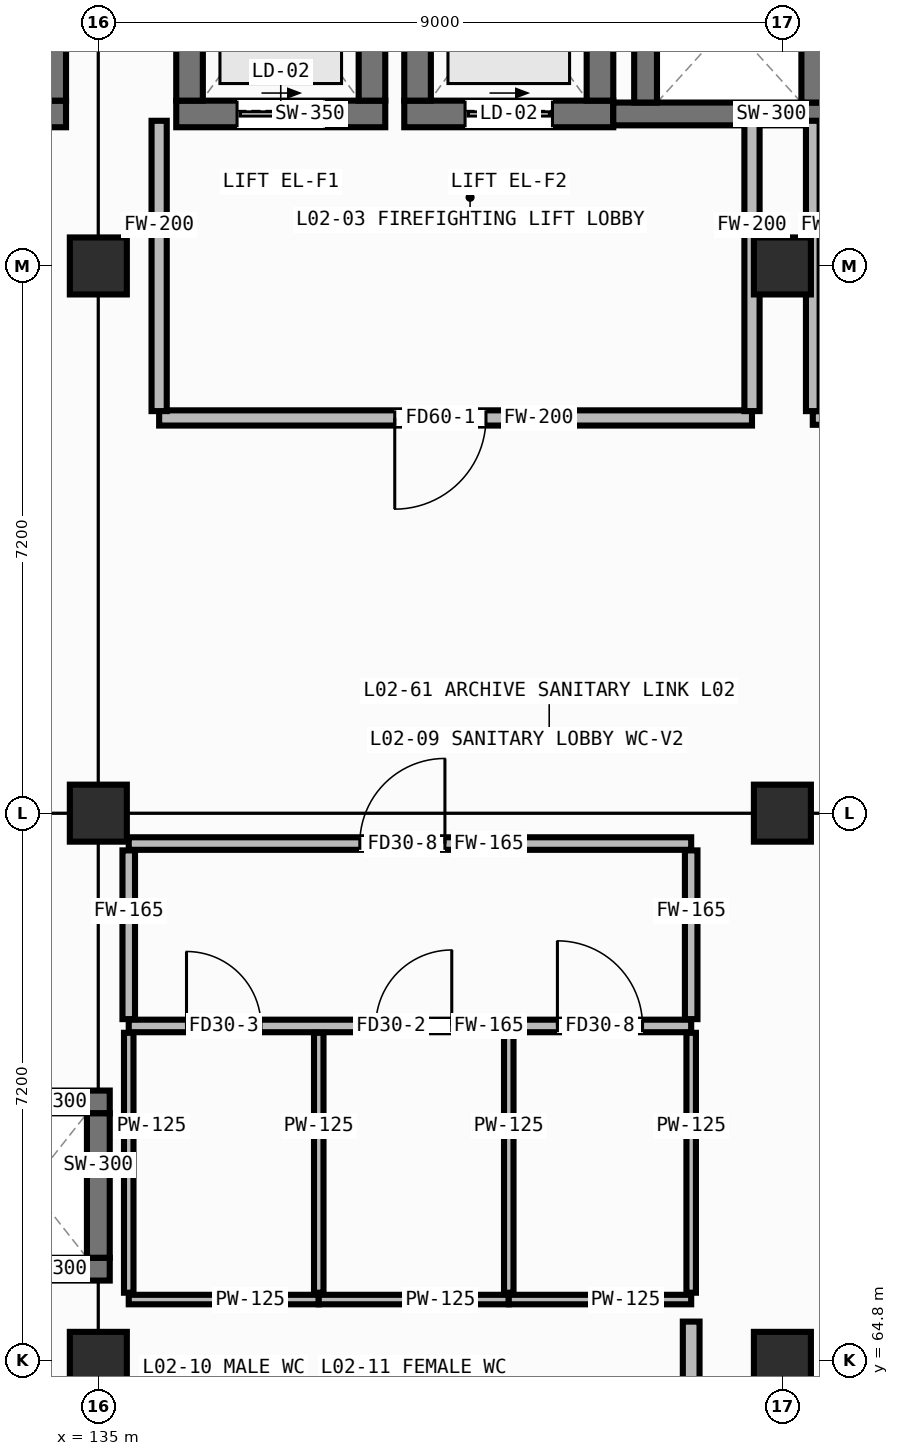
"""IFC4 building model, lengths in metres.
Left out: names, types, materials, properties, quantities, classifications, styles, units other than length and angle.
Written with IfcOpenShell. Run it as: python <this file> out.ifc"""

import sys

from ifc_helpers import new_model, si_unit, direction, frame, frame_2d, origin, origin_2d, place, context, subcontext, project, spatial, rectangle, hollow_rectangle, extrude, element, fill, save


model = new_model("IFC4")
c1 = context("Model", 3, precision=1e-05, world=origin(), true_north=direction((0.0, 1.0)))
c2 = subcontext(c1, "Body", "Model", "MODEL_VIEW")
j1 = project(units=[si_unit("LENGTHUNIT", "METRE"), si_unit("PLANEANGLEUNIT", "RADIAN")], contexts=[c1])
p1 = place(None, origin())
s1 = spatial("IfcSite", under=j1, at=p1, CompositionType="ELEMENT")
p2 = place(p1, origin())
s2 = spatial("IfcBuilding", under=s1, at=p2, CompositionType="ELEMENT")
p3 = place(p2, frame((0.0, 0.0, 4.8)))
s3 = spatial("IfcBuildingStorey", under=s2, at=p3, CompositionType="ELEMENT", Elevation=4.8)
for number, where, z_axis, x_axis in (
    (1, (135.0, 64.8, 0.0), (0.0, 0.0, 1.0), (1.0, 0.0, 0.0)),
    (2, (135.0, 72.0, 0.0), (0.0, 0.0, 1.0), (1.0, 0.0, 0.0)),
    (3, (135.0, 79.2, 0.0), (0.0, 0.0, 1.0), (1.0, 0.0, 0.0)),
    (4, (144.0, 64.8, 0.0), (0.0, 0.0, 1.0), (1.0, 0.0, 0.0)),
    (5, (144.0, 72.0, 0.0), (0.0, 0.0, 1.0), (1.0, 0.0, 0.0)),
    (6, (144.0, 79.2, 0.0), (0.0, 0.0, 1.0), (1.0, 0.0, 0.0)),
):
    element("IfcColumn", number, at=place(p3, frame(where, z_axis=z_axis, x_axis=x_axis)), inside=s3, PredefinedType="COLUMN", context=c2, shape_type="SweptSolid", body=[
        extrude(hollow_rectangle(XDim=0.75, YDim=0.75, WallThickness=0.032, at=origin_2d()), origin(), (0.0, 0.0, 1.0), 4.0),
    ])
p4 = place(p3, frame((126.425, 81.2, 0.0), z_axis=(0.0, 0.0, 1.0), x_axis=(1.0, 0.0, 0.0)))
e7 = element("IfcWall", 7, at=p4, inside=s3, PredefinedType="SHEAR", context=c2, shape_type="SweptSolid", body=[
    extrude(rectangle(XDim=8.15, YDim=0.35, at=frame_2d((4.075, 0.0))), origin(), (0.0, 0.0, 1.0), 3.755),
])
p5 = place(p4, frame((0.525, 0.0, 0.0)))
e8 = element("IfcOpeningElement", 8, at=p5, cuts=e7, PredefinedType="OPENING", context=c2, shape_type="SweptSolid", body=[
    extrude(rectangle(XDim=1.15, YDim=2.1, at=frame_2d((0.575, 1.05))), frame((0.0, 0.187, 0.0), z_axis=(0.0, -1.0, 0.0), x_axis=(1.0, 0.0, 0.0)), (0.0, 0.0, 1.0), 0.374),
])
p6 = place(p3, frame((134.4, 81.375, 0.0), z_axis=(0.0, 0.0, 1.0), x_axis=(0.0, 1.0, 0.0)))
e9 = element("IfcWall", 9, at=p6, inside=s3, PredefinedType="SHEAR", context=c2, shape_type="SweptSolid", body=[
    extrude(rectangle(XDim=3.55, YDim=0.35, at=frame_2d((1.775, 0.0))), origin(), (0.0, 0.0, 1.0), 3.755),
])
p7 = place(p3, frame((136.025, 81.2, 0.0), z_axis=(0.0, 0.0, 1.0), x_axis=(1.0, 0.0, 0.0)))
e10 = element("IfcWall", 10, at=p7, inside=s3, PredefinedType="SHEAR", context=c2, shape_type="SweptSolid", body=[
    extrude(rectangle(XDim=2.75, YDim=0.35, at=frame_2d((1.375, 0.0))), origin(), (0.0, 0.0, 1.0), 3.755),
])
p8 = place(p7, frame((0.8, 0.0, 0.0)))
e11 = element("IfcOpeningElement", 11, at=p8, cuts=e10, PredefinedType="OPENING", context=c2, shape_type="SweptSolid", body=[
    extrude(rectangle(XDim=1.15, YDim=2.12, at=frame_2d((0.575, 1.06))), frame((0.0, 0.187, 0.0), z_axis=(0.0, -1.0, 0.0), x_axis=(1.0, 0.0, 0.0)), (0.0, 0.0, 1.0), 0.374),
])
for number, where, z_axis, x_axis in (
    (12, (136.2, 81.375, 0.0), (0.0, 0.0, 1.0), (0.0, 1.0, 0.0)),
    (13, (138.6, 81.375, 0.0), (0.0, 0.0, 1.0), (0.0, 1.0, 0.0)),
):
    element("IfcWall", number, at=place(p3, frame(where, z_axis=z_axis, x_axis=x_axis)), inside=s3, PredefinedType="SHEAR", context=c2, shape_type="SweptSolid", body=[
        extrude(rectangle(XDim=2.85, YDim=0.35, at=frame_2d((1.425, 0.0))), origin(), (0.0, 0.0, 1.0), 3.755),
    ])
p9 = place(p3, frame((139.025, 81.2, 0.0), z_axis=(0.0, 0.0, 1.0), x_axis=(1.0, 0.0, 0.0)))
e14 = element("IfcWall", 14, at=p9, inside=s3, PredefinedType="SHEAR", context=c2, shape_type="SweptSolid", body=[
    extrude(rectangle(XDim=2.75, YDim=0.35, at=frame_2d((1.375, 0.0))), origin(), (0.0, 0.0, 1.0), 3.755),
])
p10 = place(p9, frame((0.8, 0.0, 0.0)))
e15 = element("IfcOpeningElement", 15, at=p10, cuts=e14, PredefinedType="OPENING", context=c2, shape_type="SweptSolid", body=[
    extrude(rectangle(XDim=1.15, YDim=2.12, at=frame_2d((0.575, 1.06))), frame((0.0, 0.187, 0.0), z_axis=(0.0, -1.0, 0.0), x_axis=(1.0, 0.0, 0.0)), (0.0, 0.0, 1.0), 0.374),
])
for number, where, z_axis, x_axis in (
    (16, (139.2, 81.375, 0.0), (0.0, 0.0, 1.0), (0.0, 1.0, 0.0)),
    (17, (141.6, 81.375, 0.0), (0.0, 0.0, 1.0), (0.0, 1.0, 0.0)),
):
    element("IfcWall", number, at=place(p3, frame(where, z_axis=z_axis, x_axis=x_axis)), inside=s3, PredefinedType="SHEAR", context=c2, shape_type="SweptSolid", body=[
        extrude(rectangle(XDim=2.85, YDim=0.35, at=frame_2d((1.425, 0.0))), origin(), (0.0, 0.0, 1.0), 3.755),
    ])
p11 = place(p3, frame((141.775, 81.2, 0.0), z_axis=(0.0, 0.0, 1.0), x_axis=(1.0, 0.0, 0.0)))
e18 = element("IfcWall", 18, at=p11, inside=s3, PredefinedType="SHEAR", context=c2, shape_type="SweptSolid", body=[
    extrude(rectangle(XDim=3.25, YDim=0.3, at=frame_2d((1.625, 0.0))), origin(), (0.0, 0.0, 1.0), 3.755),
])
for number, where, z_axis, x_axis in (
    (19, (142.2, 81.35, 0.0), (0.0, 0.0, 1.0), (0.0, 1.0, 0.0)),
    (20, (144.4, 81.35, 0.0), (0.0, 0.0, 1.0), (0.0, 1.0, 0.0)),
    (21, (133.05, 66.0, 0.0), (0.0, 0.0, 1.0), (1.0, 0.0, 0.0)),
    (22, (133.05, 68.2, 0.0), (0.0, 0.0, 1.0), (1.0, 0.0, 0.0)),
):
    element("IfcWall", number, at=place(p3, frame(where, z_axis=z_axis, x_axis=x_axis)), inside=s3, PredefinedType="SHEAR", context=c2, shape_type="SweptSolid", body=[
        extrude(rectangle(XDim=2.1, YDim=0.3, at=frame_2d((1.05, 0.0))), origin(), (0.0, 0.0, 1.0), 3.755),
    ])
p12 = place(p3, frame((135.0, 66.15, 0.0), z_axis=(0.0, 0.0, 1.0), x_axis=(0.0, 1.0, 0.0)))
e23 = element("IfcWall", 23, at=p12, inside=s3, PredefinedType="SHEAR", context=c2, shape_type="SweptSolid", body=[
    extrude(rectangle(XDim=1.9, YDim=0.3, at=frame_2d((0.95, 0.0))), origin(), (0.0, 0.0, 1.0), 3.755),
])
p13 = place(p3, frame((135.8, 77.2, 0.0), z_axis=(0.0, 0.0, 1.0), x_axis=(1.0, 0.0, 0.0)))
e24 = element("IfcWall", 24, at=p13, inside=s3, PredefinedType="PARTITIONING", context=c2, shape_type="SweptSolid", body=[
    extrude(rectangle(XDim=7.8, YDim=0.2, at=frame_2d((3.9, 0.0))), origin(), (0.0, 0.0, 1.0), 3.755),
])
p14 = place(p13, frame((3.1, 0.0, 0.0)))
e25 = element("IfcOpeningElement", 25, at=p14, cuts=e24, PredefinedType="OPENING", context=c2, shape_type="SweptSolid", body=[
    extrude(rectangle(XDim=1.2, YDim=2.1, at=frame_2d((0.6, 1.05))), frame((0.0, 0.112, 0.0), z_axis=(0.0, -1.0, 0.0), x_axis=(1.0, 0.0, 0.0)), (0.0, 0.0, 1.0), 0.224),
])
for number, where, z_axis, x_axis in (
    (26, (135.8, 77.29, 0.0), (0.0, 0.0, 1.0), (0.0, 1.0, 0.0)),
    (27, (143.6, 77.29, 0.0), (0.0, 0.0, 1.0), (0.0, 1.0, 0.0)),
):
    element("IfcWall", number, at=place(p3, frame(where, z_axis=z_axis, x_axis=x_axis)), inside=s3, PredefinedType="PARTITIONING", context=c2, shape_type="SweptSolid", body=[
        extrude(rectangle(XDim=3.82, YDim=0.2, at=frame_2d((1.91, 0.0))), origin(), (0.0, 0.0, 1.0), 3.755),
    ])
p15 = place(p3, frame((144.4, 77.2, 0.0), z_axis=(0.0, 0.0, 1.0), x_axis=(1.0, 0.0, 0.0)))
e28 = element("IfcWall", 28, at=p15, inside=s3, PredefinedType="PARTITIONING", context=c2, shape_type="SweptSolid", body=[
    extrude(rectangle(XDim=8.2, YDim=0.18, at=frame_2d((4.1, 0.0))), origin(), (0.0, 0.0, 1.0), 3.755),
])
p16 = place(p15, frame((3.54, 0.0, 0.0)))
e29 = element("IfcOpeningElement", 29, at=p16, cuts=e28, PredefinedType="OPENING", context=c2, shape_type="SweptSolid", body=[
    extrude(rectangle(XDim=1.12, YDim=2.08, at=frame_2d((0.56, 1.04))), frame((0.0, 0.102, 0.0), z_axis=(0.0, -1.0, 0.0), x_axis=(1.0, 0.0, 0.0)), (0.0, 0.0, 1.0), 0.204),
])
p17 = place(p3, frame((144.4, 77.29, 0.0), z_axis=(0.0, 0.0, 1.0), x_axis=(0.0, 1.0, 0.0)))
e30 = element("IfcWall", 30, at=p17, inside=s3, PredefinedType="PARTITIONING", context=c2, shape_type="SweptSolid", body=[
    extrude(rectangle(XDim=3.82, YDim=0.18, at=frame_2d((1.91, 0.0))), origin(), (0.0, 0.0, 1.0), 3.755),
])
p18 = place(p3, frame((135.4, 69.2, 0.0), z_axis=(0.0, 0.0, 1.0), x_axis=(1.0, 0.0, 0.0)))
e31 = element("IfcWall", 31, at=p18, inside=s3, PredefinedType="PARTITIONING", context=c2, shape_type="SweptSolid", body=[
    extrude(rectangle(XDim=7.4, YDim=0.165, at=frame_2d((3.7, 0.0))), origin(), (0.0, 0.0, 1.0), 3.755),
])
p19 = place(p18, frame((0.76, 0.0, 0.0)))
e32 = element("IfcOpeningElement", 32, at=p19, cuts=e31, PredefinedType="OPENING", context=c2, shape_type="SweptSolid", body=[
    extrude(rectangle(XDim=0.98, YDim=2.02, at=frame_2d((0.49, 1.01))), frame((0.0, 0.094, 0.0), z_axis=(0.0, -1.0, 0.0), x_axis=(1.0, 0.0, 0.0)), (0.0, 0.0, 1.0), 0.189),
])
p20 = place(p18, frame((3.25, 0.0, 0.0)))
e33 = element("IfcOpeningElement", 33, at=p20, cuts=e31, PredefinedType="OPENING", context=c2, shape_type="SweptSolid", body=[
    extrude(rectangle(XDim=1.0, YDim=2.08, at=frame_2d((0.5, 1.04))), frame((0.0, 0.094, 0.0), z_axis=(0.0, -1.0, 0.0), x_axis=(1.0, 0.0, 0.0)), (0.0, 0.0, 1.0), 0.189),
])
p21 = place(p18, frame((5.64, 0.0, 0.0)))
e34 = element("IfcOpeningElement", 34, at=p21, cuts=e31, PredefinedType="OPENING", context=c2, shape_type="SweptSolid", body=[
    extrude(rectangle(XDim=1.12, YDim=2.08, at=frame_2d((0.56, 1.04))), frame((0.0, 0.094, 0.0), z_axis=(0.0, -1.0, 0.0), x_axis=(1.0, 0.0, 0.0)), (0.0, 0.0, 1.0), 0.189),
])
p22 = place(p3, frame((135.4, 71.6, 0.0), z_axis=(0.0, 0.0, 1.0), x_axis=(1.0, 0.0, 0.0)))
e35 = element("IfcWall", 35, at=p22, inside=s3, PredefinedType="PARTITIONING", context=c2, shape_type="SweptSolid", body=[
    extrude(rectangle(XDim=7.4, YDim=0.165, at=frame_2d((3.7, 0.0))), origin(), (0.0, 0.0, 1.0), 3.755),
])
p23 = place(p22, frame((3.04, 0.0, 0.0)))
e36 = element("IfcOpeningElement", 36, at=p23, cuts=e35, PredefinedType="OPENING", context=c2, shape_type="SweptSolid", body=[
    extrude(rectangle(XDim=1.12, YDim=2.08, at=frame_2d((0.56, 1.04))), frame((0.0, 0.094, 0.0), z_axis=(0.0, -1.0, 0.0), x_axis=(1.0, 0.0, 0.0)), (0.0, 0.0, 1.0), 0.189),
])
for number, where, z_axis, x_axis in (
    (37, (135.4, 69.29, 0.0), (0.0, 0.0, 1.0), (0.0, 1.0, 0.0)),
    (38, (142.8, 69.29, 0.0), (0.0, 0.0, 1.0), (0.0, 1.0, 0.0)),
):
    element("IfcWall", number, at=place(p3, frame(where, z_axis=z_axis, x_axis=x_axis)), inside=s3, PredefinedType="PARTITIONING", context=c2, shape_type="SweptSolid", body=[
        extrude(rectangle(XDim=2.22, YDim=0.165, at=frame_2d((1.11, 0.0))), origin(), (0.0, 0.0, 1.0), 3.755),
    ])
p24 = place(p3, frame((135.4, 65.6, 0.0), z_axis=(0.0, 0.0, 1.0), x_axis=(1.0, 0.0, 0.0)))
e39 = element("IfcWall", 39, at=p24, inside=s3, PredefinedType="PARTITIONING", context=c2, shape_type="SweptSolid", body=[
    extrude(rectangle(XDim=2.5, YDim=0.125, at=frame_2d((1.25, 0.0))), origin(), (0.0, 0.0, 1.0), 3.755),
])
for number, where, z_axis, x_axis in (
    (40, (135.4, 65.69, 0.0), (0.0, 0.0, 1.0), (0.0, 1.0, 0.0)),
    (41, (137.9, 65.69, 0.0), (0.0, 0.0, 1.0), (0.0, 1.0, 0.0)),
):
    element("IfcWall", number, at=place(p3, frame(where, z_axis=z_axis, x_axis=x_axis)), inside=s3, PredefinedType="PARTITIONING", context=c2, shape_type="SweptSolid", body=[
        extrude(rectangle(XDim=3.42, YDim=0.125, at=frame_2d((1.71, 0.0))), origin(), (0.0, 0.0, 1.0), 3.755),
    ])
p25 = place(p3, frame((137.9, 65.6, 0.0), z_axis=(0.0, 0.0, 1.0), x_axis=(1.0, 0.0, 0.0)))
e42 = element("IfcWall", 42, at=p25, inside=s3, PredefinedType="PARTITIONING", context=c2, shape_type="SweptSolid", body=[
    extrude(rectangle(XDim=2.5, YDim=0.125, at=frame_2d((1.25, 0.0))), origin(), (0.0, 0.0, 1.0), 3.755),
])
p26 = place(p3, frame((140.4, 65.69, 0.0), z_axis=(0.0, 0.0, 1.0), x_axis=(0.0, 1.0, 0.0)))
e43 = element("IfcWall", 43, at=p26, inside=s3, PredefinedType="PARTITIONING", context=c2, shape_type="SweptSolid", body=[
    extrude(rectangle(XDim=3.42, YDim=0.125, at=frame_2d((1.71, 0.0))), origin(), (0.0, 0.0, 1.0), 3.755),
])
p27 = place(p3, frame((140.4, 65.6, 0.0), z_axis=(0.0, 0.0, 1.0), x_axis=(1.0, 0.0, 0.0)))
e44 = element("IfcWall", 44, at=p27, inside=s3, PredefinedType="PARTITIONING", context=c2, shape_type="SweptSolid", body=[
    extrude(rectangle(XDim=2.4, YDim=0.125, at=frame_2d((1.2, 0.0))), origin(), (0.0, 0.0, 1.0), 3.755),
])
p28 = place(p3, frame((142.8, 65.69, 0.0), z_axis=(0.0, 0.0, 1.0), x_axis=(0.0, 1.0, 0.0)))
e45 = element("IfcWall", 45, at=p28, inside=s3, PredefinedType="PARTITIONING", context=c2, shape_type="SweptSolid", body=[
    extrude(rectangle(XDim=3.42, YDim=0.125, at=frame_2d((1.71, 0.0))), origin(), (0.0, 0.0, 1.0), 3.755),
])
p29 = place(p3, frame((142.8, 54.49, 0.0), z_axis=(0.0, 0.0, 1.0), x_axis=(0.0, 1.0, 0.0)))
e46 = element("IfcWall", 46, at=p29, inside=s3, PredefinedType="PARTITIONING", context=c2, shape_type="SweptSolid", body=[
    extrude(rectangle(XDim=10.82, YDim=0.22, at=frame_2d((5.41, 0.0))), origin(), (0.0, 0.0, 1.0), 3.755),
])
p30 = place(p29, frame((6.035, 0.0, 0.0)))
e47 = element("IfcOpeningElement", 47, at=p30, cuts=e46, PredefinedType="OPENING", context=c2, shape_type="SweptSolid", body=[
    extrude(rectangle(XDim=1.35, YDim=2.08, at=frame_2d((0.675, 1.04))), frame((0.0, 0.122, 0.0), z_axis=(0.0, -1.0, 0.0), x_axis=(1.0, 0.0, 0.0)), (0.0, 0.0, 1.0), 0.244),
])
p31 = place(p8, origin())
e48 = element("IfcDoor", 48, at=p31, inside=s3, OperationType="SLIDING_TO_LEFT", PredefinedType="DOOR", context=c2, shape_type="SweptSolid", body=[
    extrude(rectangle(XDim=1.15, YDim=2.12, at=frame_2d((0.575, 1.06))), frame((0.0, 0.025, 0.0), z_axis=(0.0, -1.0, 0.0), x_axis=(1.0, 0.0, 0.0)), (0.0, 0.0, 1.0), 0.05),
])
fill(e11, e48)
p32 = place(p10, origin())
e49 = element("IfcDoor", 49, at=p32, inside=s3, OperationType="SLIDING_TO_LEFT", PredefinedType="DOOR", context=c2, shape_type="SweptSolid", body=[
    extrude(rectangle(XDim=1.15, YDim=2.12, at=frame_2d((0.575, 1.06))), frame((0.0, 0.025, 0.0), z_axis=(0.0, -1.0, 0.0), x_axis=(1.0, 0.0, 0.0)), (0.0, 0.0, 1.0), 0.05),
])
fill(e15, e49)
p33 = place(p14, frame((1.2, 0.0, 0.0), z_axis=(0.0, 0.0, 1.0), x_axis=(-1.0, 0.0, 0.0)))
e50 = element("IfcDoor", 50, at=p33, inside=s3, OperationType="SINGLE_SWING_RIGHT", PredefinedType="DOOR", context=c2, shape_type="SweptSolid", body=[
    extrude(rectangle(XDim=1.2, YDim=2.1, at=frame_2d((0.6, 1.05))), frame((0.0, 0.025, 0.0), z_axis=(0.0, -1.0, 0.0), x_axis=(1.0, 0.0, 0.0)), (0.0, 0.0, 1.0), 0.05),
])
fill(e25, e50)
p34 = place(p23, origin())
e51 = element("IfcDoor", 51, at=p34, inside=s3, OperationType="SINGLE_SWING_RIGHT", PredefinedType="DOOR", context=c2, shape_type="SweptSolid", body=[
    extrude(rectangle(XDim=1.12, YDim=2.08, at=frame_2d((0.56, 1.04))), frame((0.0, 0.025, 0.0), z_axis=(0.0, -1.0, 0.0), x_axis=(1.0, 0.0, 0.0)), (0.0, 0.0, 1.0), 0.05),
])
fill(e36, e51)
p35 = place(p19, origin())
e52 = element("IfcDoor", 52, at=p35, inside=s3, OperationType="SINGLE_SWING_LEFT", PredefinedType="DOOR", context=c2, shape_type="SweptSolid", body=[
    extrude(rectangle(XDim=0.98, YDim=2.02, at=frame_2d((0.49, 1.01))), frame((0.0, 0.025, 0.0), z_axis=(0.0, -1.0, 0.0), x_axis=(1.0, 0.0, 0.0)), (0.0, 0.0, 1.0), 0.05),
])
fill(e32, e52)
p36 = place(p20, origin())
e53 = element("IfcDoor", 53, at=p36, inside=s3, OperationType="SINGLE_SWING_RIGHT", PredefinedType="DOOR", context=c2, shape_type="SweptSolid", body=[
    extrude(rectangle(XDim=1.0, YDim=2.08, at=frame_2d((0.5, 1.04))), frame((0.0, 0.025, 0.0), z_axis=(0.0, -1.0, 0.0), x_axis=(1.0, 0.0, 0.0)), (0.0, 0.0, 1.0), 0.05),
])
fill(e33, e53)
p37 = place(p21, origin())
e54 = element("IfcDoor", 54, at=p37, inside=s3, OperationType="SINGLE_SWING_LEFT", PredefinedType="DOOR", context=c2, shape_type="SweptSolid", body=[
    extrude(rectangle(XDim=1.12, YDim=2.08, at=frame_2d((0.56, 1.04))), frame((0.0, 0.025, 0.0), z_axis=(0.0, -1.0, 0.0), x_axis=(1.0, 0.0, 0.0)), (0.0, 0.0, 1.0), 0.05),
])
fill(e34, e54)
save(model, sys.argv[1])
